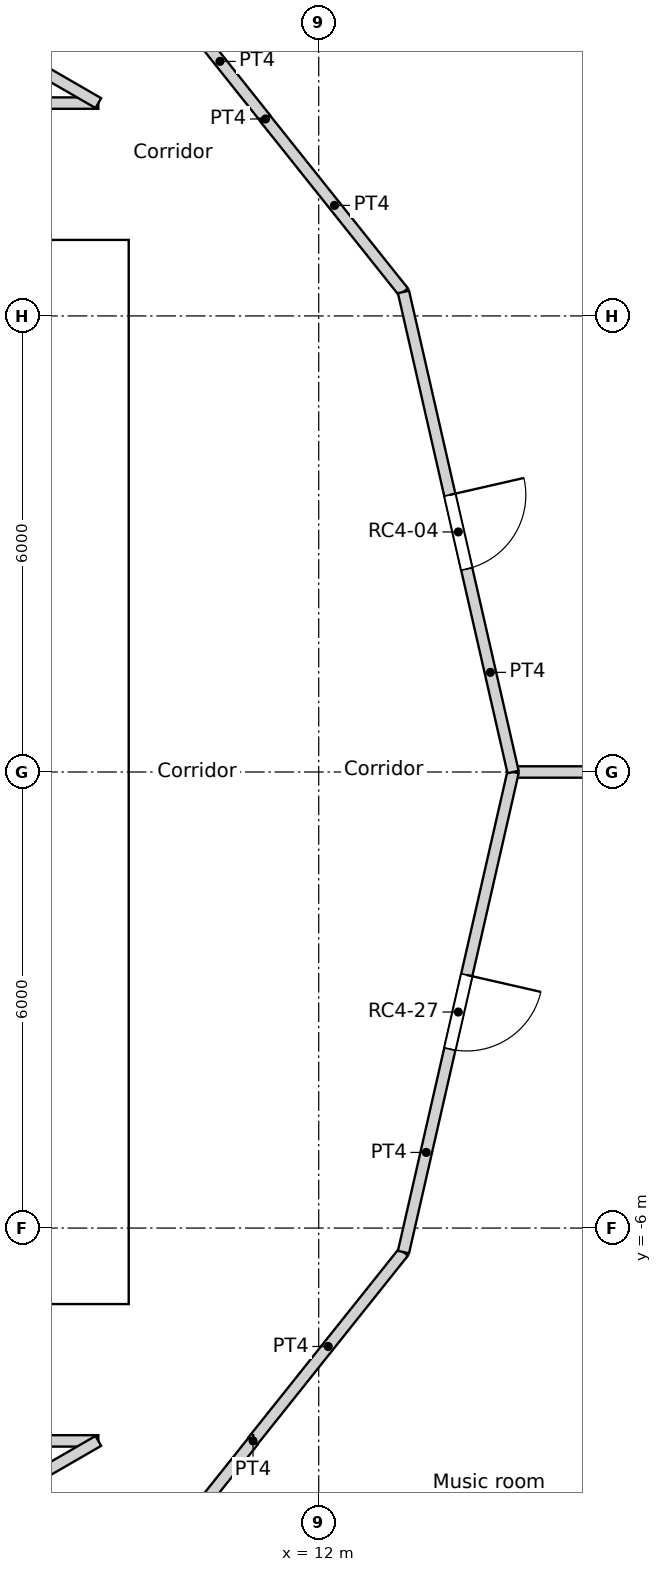
"""IFC4 building model, lengths in metres.
Left out: names, types, materials, properties, quantities, classifications, styles, units other than length and angle.
Written with IfcOpenShell. Run it as: python <this file> out.ifc"""

import sys

from ifc_helpers import new_model, si_unit, direction, frame, frame_2d, origin, place, context, subcontext, project, spatial, rectangle, extrude, element, fill, save


model = new_model("IFC4")
c1 = context("Model", 3, precision=1e-05, world=origin(), true_north=direction((0.0, 1.0)))
c2 = subcontext(c1, "Body", "Model", "MODEL_VIEW")
j1 = project(units=[si_unit("LENGTHUNIT", "METRE"), si_unit("PLANEANGLEUNIT", "RADIAN")], contexts=[c1])
p1 = place(None, origin())
s1 = spatial("IfcSite", under=j1, at=p1, CompositionType="ELEMENT")
p2 = place(p1, origin())
s2 = spatial("IfcBuilding", under=s1, at=p2, CompositionType="ELEMENT")
p3 = place(p2, frame((0.0, 0.0, 263.4)))
s3 = spatial("IfcBuildingStorey", under=s2, at=p3, CompositionType="ELEMENT", Elevation=263.4)
p4 = place(p3, frame((-9.5, -6.7, 0.0), z_axis=(0.0, 0.0, 1.0), x_axis=(1.0, 0.0, 0.0)))
e1 = element("IfcWall", 1, at=p4, inside=s3, PredefinedType="SOLIDWALL", context=c2, shape_type="SweptSolid", body=[
    extrude(rectangle(XDim=19.0, YDim=0.6, at=frame_2d((9.5, 0.0))), origin(), (0.0, 0.0, 1.0), 3.6),
])
p5 = place(p4, frame((10.4, 0.0, 0.0)))
e2 = element("IfcOpeningElement", 2, at=p5, cuts=e1, PredefinedType="OPENING", context=c2, shape_type="SweptSolid", body=[
    extrude(rectangle(XDim=1.0, YDim=2.1, at=frame_2d((0.5, 1.05))), frame((0.0, 0.3, 0.0), z_axis=(0.0, -1.0, 0.0), x_axis=(1.0, 0.0, 0.0)), (0.0, 0.0, 1.0), 0.6),
])
p6 = place(p4, frame((5.35, 0.0, 0.0)))
e3 = element("IfcOpeningElement", 3, at=p6, cuts=e1, PredefinedType="OPENING", context=c2, shape_type="SweptSolid", body=[
    extrude(rectangle(XDim=1.7, YDim=2.1, at=frame_2d((0.85, 1.05))), frame((0.0, 0.3, 0.0), z_axis=(0.0, -1.0, 0.0), x_axis=(1.0, 0.0, 0.0)), (0.0, 0.0, 1.0), 0.6),
])
p7 = place(p4, frame((11.95, 0.0, 0.0)))
e4 = element("IfcOpeningElement", 4, at=p7, cuts=e1, PredefinedType="OPENING", context=c2, shape_type="SweptSolid", body=[
    extrude(rectangle(XDim=1.7, YDim=2.1, at=frame_2d((0.85, 1.05))), frame((0.0, 0.3, 0.0), z_axis=(0.0, -1.0, 0.0), x_axis=(1.0, 0.0, 0.0)), (0.0, 0.0, 1.0), 0.6),
])
p8 = place(p3, frame((-9.5, 6.7, 0.0), z_axis=(0.0, 0.0, 1.0), x_axis=(1.0, 0.0, 0.0)))
e5 = element("IfcWall", 5, at=p8, inside=s3, PredefinedType="SOLIDWALL", context=c2, shape_type="SweptSolid", body=[
    extrude(rectangle(XDim=19.0, YDim=0.6, at=frame_2d((9.5, 0.0))), origin(), (0.0, 0.0, 1.0), 3.6),
])
p9 = place(p8, frame((5.35, 0.0, 0.0)))
e6 = element("IfcOpeningElement", 6, at=p9, cuts=e5, PredefinedType="OPENING", context=c2, shape_type="SweptSolid", body=[
    extrude(rectangle(XDim=1.7, YDim=2.1, at=frame_2d((0.85, 1.05))), frame((0.0, 0.3, 0.0), z_axis=(0.0, -1.0, 0.0), x_axis=(1.0, 0.0, 0.0)), (0.0, 0.0, 1.0), 0.6),
])
p10 = place(p3, frame((9.2, -6.4, 0.0), z_axis=(0.0, 0.0, 1.0), x_axis=(0.0, 1.0, 0.0)))
e7 = element("IfcWall", 7, at=p10, inside=s3, PredefinedType="SOLIDWALL", context=c2, shape_type="SweptSolid", body=[
    extrude(rectangle(XDim=12.8, YDim=0.6, at=frame_2d((6.4, 0.0))), origin(), (0.0, 0.0, 1.0), 3.6),
])
p11 = place(p10, frame((6.4, 0.0, 0.0)))
e8 = element("IfcOpeningElement", 8, at=p11, cuts=e7, PredefinedType="OPENING", context=c2, shape_type="SweptSolid", body=[
    extrude(rectangle(XDim=1.8, YDim=2.1, at=frame_2d((0.9, 1.05))), frame((0.0, 0.3, 0.0), z_axis=(0.0, -1.0, 0.0), x_axis=(1.0, 0.0, 0.0)), (0.0, 0.0, 1.0), 0.6),
])
p12 = place(p3, frame((2.1, -3.1, 0.0), z_axis=(0.0, 0.0, 1.0), x_axis=(1.0, 0.0, 0.0)))
e9 = element("IfcWall", 9, at=p12, inside=s3, PredefinedType="SOLIDWALL", context=c2, shape_type="SweptSolid", body=[
    extrude(rectangle(XDim=6.8, YDim=0.3, at=frame_2d((3.4, 0.0))), origin(), (0.0, 0.0, 1.0), 3.25),
])
p13 = place(p12, frame((0.35, 0.0, 0.0)))
e10 = element("IfcOpeningElement", 10, at=p13, cuts=e9, PredefinedType="OPENING", context=c2, shape_type="SweptSolid", body=[
    extrude(rectangle(XDim=1.7, YDim=2.1, at=frame_2d((0.85, 1.05))), frame((0.0, 0.15, 0.0), z_axis=(0.0, -1.0, 0.0), x_axis=(1.0, 0.0, 0.0)), (0.0, 0.0, 1.0), 0.3),
])
p14 = place(p3, frame((-4.35, 3.1, 0.0), z_axis=(0.0, 0.0, 1.0), x_axis=(1.0, 0.0, 0.0)))
e11 = element("IfcWall", 11, at=p14, inside=s3, PredefinedType="SOLIDWALL", context=c2, shape_type="SweptSolid", body=[
    extrude(rectangle(XDim=13.25, YDim=0.3, at=frame_2d((6.625, 0.0))), origin(), (0.0, 0.0, 1.0), 3.25),
])
p15 = place(p14, frame((2.95, 0.0, 0.0)))
e12 = element("IfcOpeningElement", 12, at=p15, cuts=e11, PredefinedType="OPENING", context=c2, shape_type="SweptSolid", body=[
    extrude(rectangle(XDim=1.1, YDim=2.1, at=frame_2d((0.55, 1.05))), frame((0.0, 0.15, 0.0), z_axis=(0.0, -1.0, 0.0), x_axis=(1.0, 0.0, 0.0)), (0.0, 0.0, 1.0), 0.3),
])
p16 = place(p14, frame((5.75, 0.0, 0.0)))
e13 = element("IfcOpeningElement", 13, at=p16, cuts=e11, PredefinedType="OPENING", context=c2, shape_type="SweptSolid", body=[
    extrude(rectangle(XDim=1.1, YDim=2.1, at=frame_2d((0.55, 1.05))), frame((0.0, 0.15, 0.0), z_axis=(0.0, -1.0, 0.0), x_axis=(1.0, 0.0, 0.0)), (0.0, 0.0, 1.0), 0.3),
])
p17 = place(p14, frame((8.55, 0.0, 0.0)))
e14 = element("IfcOpeningElement", 14, at=p17, cuts=e11, PredefinedType="OPENING", context=c2, shape_type="SweptSolid", body=[
    extrude(rectangle(XDim=1.1, YDim=2.1, at=frame_2d((0.55, 1.05))), frame((0.0, 0.15, 0.0), z_axis=(0.0, -1.0, 0.0), x_axis=(1.0, 0.0, 0.0)), (0.0, 0.0, 1.0), 0.3),
])
p18 = place(p3, frame((5.85, -0.425, 0.0), z_axis=(0.0, 0.0, 1.0), x_axis=(1.0, 0.0, 0.0)))
e15 = element("IfcWall", 15, at=p18, inside=s3, PredefinedType="SOLIDWALL", context=c2, shape_type="SweptSolid", body=[
    extrude(rectangle(XDim=3.05, YDim=0.15, at=frame_2d((1.525, 0.0))), origin(), (0.0, 0.0, 1.0), 3.25),
])
p19 = place(p18, frame((0.25, 0.0, 0.0)))
e16 = element("IfcOpeningElement", 16, at=p19, cuts=e15, PredefinedType="OPENING", context=c2, shape_type="SweptSolid", body=[
    extrude(rectangle(XDim=0.9, YDim=2.1, at=frame_2d((0.45, 1.05))), frame((0.0, 0.075, 0.0), z_axis=(0.0, -1.0, 0.0), x_axis=(1.0, 0.0, 0.0)), (0.0, 0.0, 1.0), 0.15),
])
p20 = place(p18, frame((1.775, 0.0, 0.0)))
e17 = element("IfcOpeningElement", 17, at=p20, cuts=e15, PredefinedType="OPENING", context=c2, shape_type="SweptSolid", body=[
    extrude(rectangle(XDim=0.9, YDim=2.1, at=frame_2d((0.45, 1.05))), frame((0.0, 0.075, 0.0), z_axis=(0.0, -1.0, 0.0), x_axis=(1.0, 0.0, 0.0)), (0.0, 0.0, 1.0), 0.15),
])
p21 = place(p3, frame((2.352, 8.8, 0.0), z_axis=(0.0, 0.0, 1.0), x_axis=(1.0, 0.0, 0.0)))
e18 = element("IfcWall", 18, at=p21, inside=s3, PredefinedType="PARTITIONING", context=c2, shape_type="SweptSolid", body=[
    extrude(rectangle(XDim=6.749, YDim=0.15, at=frame_2d((3.374, 0.0))), origin(), (0.0, 0.0, 1.0), 3.25),
])
p22 = place(p21, frame((2.87, 0.0, 0.0)))
e19 = element("IfcOpeningElement", 19, at=p22, cuts=e18, PredefinedType="OPENING", context=c2, shape_type="SweptSolid", body=[
    extrude(rectangle(XDim=1.0, YDim=2.04, at=frame_2d((0.5, 1.02))), frame((0.0, 0.075, 0.0), z_axis=(0.0, -1.0, 0.0), x_axis=(1.0, 0.0, 0.0)), (0.0, 0.0, 1.0), 0.15),
])
p23 = place(p3, frame((10.101, 10.101, 0.0), z_axis=(0.0, 0.0, 1.0), x_axis=(0.623130947784, -0.782117524362, 0.0)))
e20 = element("IfcWall", 20, at=p23, inside=s3, PredefinedType="PARTITIONING", context=c2, shape_type="SweptSolid", body=[
    extrude(rectangle(XDim=1.924, YDim=0.15, at=frame_2d((0.962, 0.0))), origin(), (0.0, 0.0, 1.0), 3.25),
])
p24 = place(p3, frame((11.3, 8.586, 0.0), z_axis=(0.0, 0.0, 1.0), x_axis=(0.0, 1.0, 0.0)))
e21 = element("IfcWall", 21, at=p24, inside=s3, PredefinedType="PARTITIONING", context=c2, shape_type="SweptSolid", body=[
    extrude(rectangle(XDim=0.01, YDim=0.15, at=frame_2d((0.005, 0.0))), origin(), (0.0, 0.0, 1.0), 3.25),
])
p25 = place(p3, frame((-9.092, -8.8, 0.0), z_axis=(0.0, 0.0, 1.0), x_axis=(1.0, 0.0, 0.0)))
e22 = element("IfcWall", 22, at=p25, inside=s3, PredefinedType="PARTITIONING", context=c2, shape_type="SweptSolid", body=[
    extrude(rectangle(XDim=18.193, YDim=0.15, at=frame_2d((9.096, 0.0))), origin(), (0.0, 0.0, 1.0), 3.25),
])
p26 = place(p25, frame((8.592, 0.0, 0.0)))
e23 = element("IfcOpeningElement", 23, at=p26, cuts=e22, PredefinedType="OPENING", context=c2, shape_type="SweptSolid", body=[
    extrude(rectangle(XDim=1.0, YDim=2.04, at=frame_2d((0.5, 1.02))), frame((0.0, 0.075, 0.0), z_axis=(0.0, -1.0, 0.0), x_axis=(1.0, 0.0, 0.0)), (0.0, 0.0, 1.0), 0.15),
])
p27 = place(p3, frame((9.078, -11.382, 0.0), z_axis=(0.0, 0.0, 1.0), x_axis=(0.624018330412, 0.781409702595, 0.0)))
e24 = element("IfcWall", 24, at=p27, inside=s3, PredefinedType="PARTITIONING", context=c2, shape_type="SweptSolid", body=[
    extrude(rectangle(XDim=3.301, YDim=0.15, at=frame_2d((1.65, 0.0))), origin(), (0.0, 0.0, 1.0), 3.25),
])
p28 = place(p3, frame((11.137, -8.8, 0.0), z_axis=(0.0, 0.0, 1.0), x_axis=(-1.0, 0.0, 0.0)))
e25 = element("IfcWall", 25, at=p28, inside=s3, PredefinedType="PARTITIONING", context=c2, shape_type="SweptSolid", body=[
    extrude(rectangle(XDim=0.003, YDim=0.15, at=frame_2d((0.001, 0.0))), origin(), (0.0, 0.0, 1.0), 3.25),
])
p29 = place(p3, frame((11.3, 8.592, 0.0), z_axis=(0.0, 0.0, 1.0), x_axis=(0.623446514299, -0.781866001185, 0.0)))
e26 = element("IfcWall", 26, at=p29, inside=s3, PredefinedType="PARTITIONING", context=c2, shape_type="SweptSolid", body=[
    extrude(rectangle(XDim=2.911, YDim=0.15, at=frame_2d((1.456, 0.0))), origin(), (0.0, 0.0, 1.0), 3.25),
])
p30 = place(p3, frame((13.115, 6.316, 0.0), z_axis=(0.0, 0.0, 1.0), x_axis=(0.222568978642, -0.97491694505, 0.0)))
e27 = element("IfcWall", 27, at=p30, inside=s3, PredefinedType="PARTITIONING", context=c2, shape_type="SweptSolid", body=[
    extrude(rectangle(XDim=6.479, YDim=0.15, at=frame_2d((3.239, 0.0))), origin(), (0.0, 0.0, 1.0), 3.25),
])
p31 = place(p30, frame((2.739, 0.0, 0.0)))
e28 = element("IfcOpeningElement", 28, at=p31, cuts=e27, PredefinedType="OPENING", context=c2, shape_type="SweptSolid", body=[
    extrude(rectangle(XDim=1.0, YDim=2.04, at=frame_2d((0.5, 1.02))), frame((0.0, 0.075, 0.0), z_axis=(0.0, -1.0, 0.0), x_axis=(1.0, 0.0, 0.0)), (0.0, 0.0, 1.0), 0.15),
])
p32 = place(p3, frame((13.115, -6.316, 0.0), z_axis=(0.0, 0.0, 1.0), x_axis=(0.222568978642, 0.97491694505, 0.0)))
e29 = element("IfcWall", 29, at=p32, inside=s3, PredefinedType="PARTITIONING", context=c2, shape_type="SweptSolid", body=[
    extrude(rectangle(XDim=6.479, YDim=0.15, at=frame_2d((3.239, 0.0))), origin(), (0.0, 0.0, 1.0), 3.25),
])
p33 = place(p32, frame((2.74, 0.0, 0.0)))
e30 = element("IfcOpeningElement", 30, at=p33, cuts=e29, PredefinedType="OPENING", context=c2, shape_type="SweptSolid", body=[
    extrude(rectangle(XDim=1.0, YDim=2.04, at=frame_2d((0.5, 1.02))), frame((0.0, 0.075, 0.0), z_axis=(0.0, -1.0, 0.0), x_axis=(1.0, 0.0, 0.0)), (0.0, 0.0, 1.0), 0.15),
])
p34 = place(p3, frame((11.134, -8.8, 0.0), z_axis=(0.0, 0.0, 1.0), x_axis=(0.623476099415, 0.781842409606, 0.0)))
e31 = element("IfcWall", 31, at=p34, inside=s3, PredefinedType="PARTITIONING", context=c2, shape_type="SweptSolid", body=[
    extrude(rectangle(XDim=3.177, YDim=0.15, at=frame_2d((1.589, 0.0))), origin(), (0.0, 0.0, 1.0), 3.25),
])
for number, where, z_axis, x_axis in (
    (32, (3.261, 12.171, 0.0), (0.0, 0.0, 1.0), (0.866, -0.5, 0.0)),
    (33, (3.261, -12.171, 0.0), (0.0, 0.0, 1.0), (0.866, 0.5, 0.0)),
):
    element("IfcWall", number, at=place(p3, frame(where, z_axis=z_axis, x_axis=x_axis)), inside=s3, PredefinedType="PARTITIONING", context=c2, shape_type="SweptSolid", body=[
        extrude(rectangle(XDim=6.743, YDim=0.15, at=frame_2d((3.371, 0.0))), origin(), (0.0, 0.0, 1.0), 3.25),
    ])
p35 = place(p3, frame((14.557, 0.0, 0.0), z_axis=(0.0, 0.0, 1.0), x_axis=(1.0, 0.0, 0.0)))
e34 = element("IfcWall", 34, at=p35, inside=s3, PredefinedType="PARTITIONING", context=c2, shape_type="SweptSolid", body=[
    extrude(rectangle(XDim=5.214, YDim=0.15, at=frame_2d((2.607, 0.0))), origin(), (0.0, 0.0, 1.0), 3.25),
])
p36 = place(p11, origin())
e35 = element("IfcDoor", 35, at=p36, inside=s3, OperationType="DOUBLE_DOOR_SINGLE_SWING", PredefinedType="DOOR", context=c2, shape_type="SweptSolid", body=[
    extrude(rectangle(XDim=1.8, YDim=2.1, at=frame_2d((0.9, 1.05))), frame((0.0, 0.025, 0.0), z_axis=(0.0, -1.0, 0.0), x_axis=(1.0, 0.0, 0.0)), (0.0, 0.0, 1.0), 0.05),
])
fill(e8, e35)
p37 = place(p20, origin())
e36 = element("IfcDoor", 36, at=p37, inside=s3, OperationType="SINGLE_SWING_LEFT", PredefinedType="DOOR", context=c2, shape_type="SweptSolid", body=[
    extrude(rectangle(XDim=0.9, YDim=2.1, at=frame_2d((0.45, 1.05))), frame((0.0, 0.025, 0.0), z_axis=(0.0, -1.0, 0.0), x_axis=(1.0, 0.0, 0.0)), (0.0, 0.0, 1.0), 0.05),
])
fill(e17, e36)
p38 = place(p31, origin())
e37 = element("IfcDoor", 37, at=p38, inside=s3, OperationType="SINGLE_SWING_LEFT", PredefinedType="DOOR", context=c2, shape_type="SweptSolid", body=[
    extrude(rectangle(XDim=1.0, YDim=2.04, at=frame_2d((0.5, 1.02))), frame((0.0, 0.025, 0.0), z_axis=(0.0, -1.0, 0.0), x_axis=(1.0, 0.0, 0.0)), (0.0, 0.0, 1.0), 0.05),
])
fill(e28, e37)
p39 = place(p33, origin())
e38 = element("IfcDoor", 38, at=p39, inside=s3, OperationType="SINGLE_SWING_LEFT", PredefinedType="DOOR", context=c2, shape_type="SweptSolid", body=[
    extrude(rectangle(XDim=1.0, YDim=2.04, at=frame_2d((0.5, 1.02))), frame((0.0, 0.025, 0.0), z_axis=(0.0, -1.0, 0.0), x_axis=(1.0, 0.0, 0.0)), (0.0, 0.0, 1.0), 0.05),
])
fill(e30, e38)
save(model, sys.argv[1])
